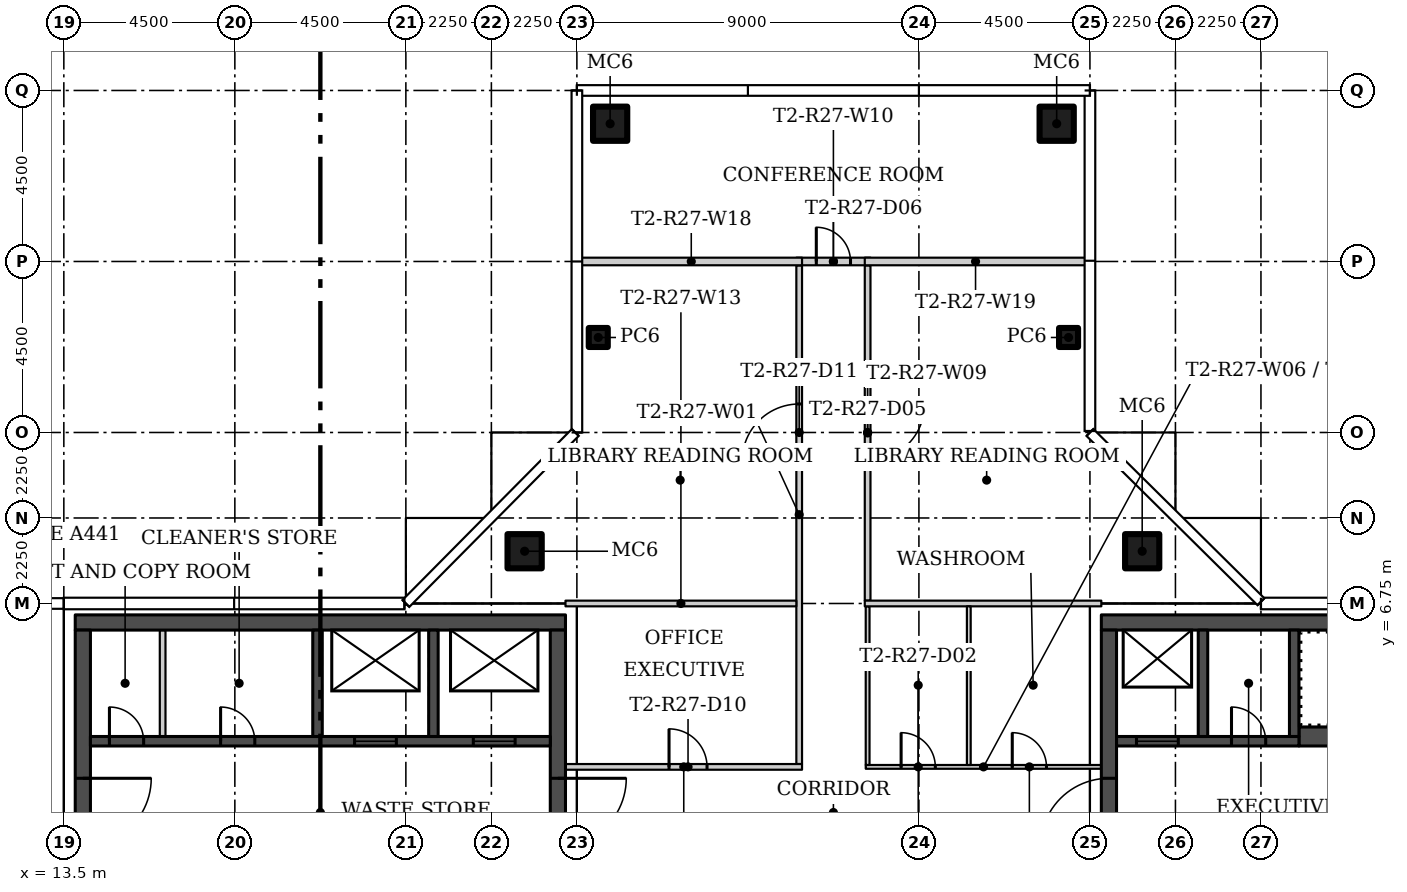
"""IFC4 building model, lengths in metres.
Left out: names, types, materials, properties, quantities, classifications, styles, units other than length and angle.
Written with IfcOpenShell. Run it as: python <this file> out.ifc"""

import sys

from ifc_helpers import new_model, si_unit, direction, frame, frame_2d, origin, origin_2d, place, context, subcontext, project, spatial, rectangle, hollow_rectangle, extrude, element, fill, save


model = new_model("IFC4")
c1 = context("Model", 3, precision=1e-05, world=origin(), true_north=direction((0.0, 1.0)))
c2 = subcontext(c1, "Body", "Model", "MODEL_VIEW")
j1 = project(units=[si_unit("LENGTHUNIT", "METRE"), si_unit("PLANEANGLEUNIT", "RADIAN")], contexts=[c1])
p1 = place(None, origin())
s1 = spatial("IfcSite", under=j1, at=p1, CompositionType="ELEMENT")
p2 = place(p1, origin())
s2 = spatial("IfcBuilding", under=s1, at=p2, CompositionType="ELEMENT")
p3 = place(p2, frame((0.0, 0.0, 249.9)))
s3 = spatial("IfcBuildingStorey", under=s2, at=p3, CompositionType="ELEMENT", Elevation=249.9)
for number, where in (
    (1, (25.625, 8.125, 0.0)),
    (2, (41.875, 8.125, 0.0)),
):
    element("IfcColumn", number, at=place(p3, frame(where)), inside=s3, PredefinedType="COLUMN", context=c2, shape_type="SweptSolid", body=[
        extrude(hollow_rectangle(XDim=0.9, YDim=0.9, WallThickness=0.036, at=origin_2d()), origin(), (0.0, 0.0, 1.0), 3.55),
    ])
p4 = place(p3, frame((39.938, 13.75, 0.0)))
e3 = element("IfcColumn", 3, at=p4, inside=s3, PredefinedType="COLUMN", context=c2, shape_type="SweptSolid", body=[
    extrude(hollow_rectangle(XDim=0.5, YDim=0.5, WallThickness=0.016, at=origin_2d()), origin(), (0.0, 0.0, 1.0), 3.55),
])
p5 = place(p3, frame((39.625, 19.375, 0.0)))
e4 = element("IfcColumn", 4, at=p5, inside=s3, PredefinedType="COLUMN", context=c2, shape_type="SweptSolid", body=[
    extrude(hollow_rectangle(XDim=0.9, YDim=0.9, WallThickness=0.036, at=origin_2d()), origin(), (0.0, 0.0, 1.0), 3.55),
])
p6 = place(p3, frame((27.562, 13.75, 0.0)))
e5 = element("IfcColumn", 5, at=p6, inside=s3, PredefinedType="COLUMN", context=c2, shape_type="SweptSolid", body=[
    extrude(hollow_rectangle(XDim=0.5, YDim=0.5, WallThickness=0.016, at=origin_2d()), origin(), (0.0, 0.0, 1.0), 3.55),
])
p7 = place(p3, frame((27.875, 19.375, 0.0)))
e6 = element("IfcColumn", 6, at=p7, inside=s3, PredefinedType="COLUMN", context=c2, shape_type="SweptSolid", body=[
    extrude(hollow_rectangle(XDim=0.9, YDim=0.9, WallThickness=0.036, at=origin_2d()), origin(), (0.0, 0.0, 1.0), 3.55),
])
p8 = place(p3, frame((32.85, 2.525, 0.0), z_axis=(0.0, 0.0, 1.0), x_axis=(0.0, 1.0, 0.0)))
e7 = element("IfcWall", 7, at=p8, inside=s3, PredefinedType="PARTITIONING", context=c2, shape_type="SweptSolid", body=[
    extrude(rectangle(XDim=13.125, YDim=0.15, at=frame_2d((6.562, 0.0))), origin(), (0.0, 0.0, 1.0), 3.55),
])
p9 = place(p8, frame((7.975, 0.0, 0.0)))
e8 = element("IfcOpeningElement", 8, at=p9, cuts=e7, PredefinedType="OPENING", context=c2, shape_type="SweptSolid", body=[
    extrude(rectangle(XDim=1.5, YDim=2.1, at=frame_2d((0.75, 1.05))), frame((0.0, 0.085, 0.0), z_axis=(0.0, -1.0, 0.0), x_axis=(1.0, 0.0, 0.0)), (0.0, 0.0, 1.0), 0.17),
])
p10 = place(p3, frame((26.7, 2.45, 0.0)))
e9 = element("IfcWall", 9, at=p10, inside=s3, PredefinedType="PARTITIONING", context=c2, shape_type="SweptSolid", body=[
    extrude(rectangle(XDim=6.225, YDim=0.15, at=frame_2d((3.112, 0.0))), origin(), (0.0, 0.0, 1.0), 3.55),
])
p11 = place(p10, frame((2.725, 0.0, 0.0)))
e10 = element("IfcOpeningElement", 10, at=p11, cuts=e9, PredefinedType="OPENING", context=c2, shape_type="SweptSolid", body=[
    extrude(rectangle(XDim=1.0, YDim=2.4, at=frame_2d((0.5, 1.2))), frame((0.0, 0.085, 0.0), z_axis=(0.0, -1.0, 0.0), x_axis=(1.0, 0.0, 0.0)), (0.0, 0.0, 1.0), 0.17),
])
p12 = place(p3, frame((34.6, 2.45, 0.0)))
e11 = element("IfcWall", 11, at=p12, inside=s3, PredefinedType="PARTITIONING", context=c2, shape_type="SweptSolid", body=[
    extrude(rectangle(XDim=6.2, YDim=0.1, at=frame_2d((3.1, 0.0))), origin(), (0.0, 0.0, 1.0), 3.55),
])
p13 = place(p12, frame((3.856, 0.0, 0.0)))
e12 = element("IfcOpeningElement", 12, at=p13, cuts=e11, PredefinedType="OPENING", context=c2, shape_type="SweptSolid", body=[
    extrude(rectangle(XDim=0.9, YDim=2.1, at=frame_2d((0.45, 1.05))), frame((0.0, 0.06, 0.0), z_axis=(0.0, -1.0, 0.0), x_axis=(1.0, 0.0, 0.0)), (0.0, 0.0, 1.0), 0.12),
])
p14 = place(p12, frame((0.931, 0.0, 0.0)))
e13 = element("IfcOpeningElement", 13, at=p14, cuts=e11, PredefinedType="OPENING", context=c2, shape_type="SweptSolid", body=[
    extrude(rectangle(XDim=0.9, YDim=2.1, at=frame_2d((0.45, 1.05))), frame((0.0, 0.06, 0.0), z_axis=(0.0, -1.0, 0.0), x_axis=(1.0, 0.0, 0.0)), (0.0, 0.0, 1.0), 0.12),
])
p15 = place(p3, frame((34.65, 6.675, 0.0), z_axis=(0.0, 0.0, 1.0), x_axis=(0.0, -1.0, 0.0)))
e14 = element("IfcWall", 14, at=p15, inside=s3, PredefinedType="PARTITIONING", context=c2, shape_type="SweptSolid", body=[
    extrude(rectangle(XDim=4.175, YDim=0.1, at=frame_2d((2.087, 0.0))), origin(), (0.0, 0.0, 1.0), 3.55),
])
p16 = place(p3, frame((34.65, 15.65, 0.0), z_axis=(0.0, 0.0, 1.0), x_axis=(0.0, -1.0, 0.0)))
e15 = element("IfcWall", 15, at=p16, inside=s3, PredefinedType="PARTITIONING", context=c2, shape_type="SweptSolid", body=[
    extrude(rectangle(XDim=8.825, YDim=0.15, at=frame_2d((4.413, 0.0))), origin(), (0.0, 0.0, 1.0), 3.55),
])
p17 = place(p16, frame((3.65, 0.0, 0.0)))
e16 = element("IfcOpeningElement", 16, at=p17, cuts=e15, PredefinedType="OPENING", context=c2, shape_type="SweptSolid", body=[
    extrude(rectangle(XDim=1.5, YDim=2.1, at=frame_2d((0.75, 1.05))), frame((0.0, 0.085, 0.0), z_axis=(0.0, -1.0, 0.0), x_axis=(1.0, 0.0, 0.0)), (0.0, 0.0, 1.0), 0.17),
])
p18 = place(p3, frame((32.775, 15.75, 0.0)))
e17 = element("IfcWall", 17, at=p18, inside=s3, PredefinedType="PARTITIONING", context=c2, shape_type="SweptSolid", body=[
    extrude(rectangle(XDim=1.951, YDim=0.2, at=frame_2d((0.975, 0.0))), origin(), (0.0, 0.0, 1.0), 3.55),
])
p19 = place(p18, frame((0.525, 0.0, 0.0)))
e18 = element("IfcOpeningElement", 18, at=p19, cuts=e17, PredefinedType="OPENING", context=c2, shape_type="SweptSolid", body=[
    extrude(rectangle(XDim=0.9, YDim=2.4, at=frame_2d((0.45, 1.2))), frame((0.0, 0.11, 0.0), z_axis=(0.0, -1.0, 0.0), x_axis=(1.0, 0.0, 0.0)), (0.0, 0.0, 1.0), 0.22),
])
p20 = place(p3, frame((32.775, 6.75, 0.0), z_axis=(0.0, 0.0, 1.0), x_axis=(-1.0, 0.0, 0.0)))
e19 = element("IfcWall", 19, at=p20, inside=s3, PredefinedType="PARTITIONING", context=c2, shape_type="SweptSolid", body=[
    extrude(rectangle(XDim=6.075, YDim=0.15, at=frame_2d((3.037, 0.0))), origin(), (0.0, 0.0, 1.0), 3.55),
])
p21 = place(p3, frame((40.8, 6.75, 0.0), z_axis=(0.0, 0.0, 1.0), x_axis=(-1.0, 0.0, 0.0)))
e20 = element("IfcWall", 20, at=p21, inside=s3, PredefinedType="PARTITIONING", context=c2, shape_type="SweptSolid", body=[
    extrude(rectangle(XDim=6.225, YDim=0.15, at=frame_2d((3.112, 0.0))), origin(), (0.0, 0.0, 1.0), 3.55),
])
p22 = place(p3, frame((37.312, 6.675, 0.0), z_axis=(0.0, 0.0, 1.0), x_axis=(0.0, -1.0, 0.0)))
e21 = element("IfcWall", 21, at=p22, inside=s3, PredefinedType="PARTITIONING", context=c2, shape_type="SweptSolid", body=[
    extrude(rectangle(XDim=4.175, YDim=0.1, at=frame_2d((2.087, 0.0))), origin(), (0.0, 0.0, 1.0), 3.55),
])
for number, where, z_axis, x_axis in (
    (22, (32.925, 15.75, 0.0), (0.0, 0.0, 1.0), (-1.0, 0.0, 0.0)),
    (23, (40.405, 15.75, 0.0), (0.0, 0.0, 1.0), (-1.0, 0.0, 0.0)),
):
    element("IfcWall", number, at=place(p3, frame(where, z_axis=z_axis, x_axis=x_axis)), inside=s3, PredefinedType="PARTITIONING", context=c2, shape_type="SweptSolid", body=[
        extrude(rectangle(XDim=5.83, YDim=0.2, at=frame_2d((2.915, 0.0))), origin(), (0.0, 0.0, 1.0), 3.55),
    ])
p23 = place(p3, frame((13.8, 6.25, 0.0)))
e24 = element("IfcWall", 24, at=p23, inside=s3, PredefinedType="SHEAR", context=c2, shape_type="SweptSolid", body=[
    extrude(rectangle(XDim=12.9, YDim=0.4, at=frame_2d((6.45, 0.0))), origin(), (0.0, 0.0, 1.0), 3.55),
])
p24 = place(p3, frame((14.0, 6.05, 0.0), z_axis=(0.0, 0.0, 1.0), x_axis=(0.0, -1.0, 0.0)))
e25 = element("IfcWall", 25, at=p24, inside=s3, PredefinedType="SHEAR", context=c2, shape_type="SweptSolid", body=[
    extrude(rectangle(XDim=12.1, YDim=0.4, at=frame_2d((6.05, 0.0))), origin(), (0.0, 0.0, 1.0), 3.55),
])
p25 = place(p24, frame((3.9, 0.0, 0.0)))
e26 = element("IfcOpeningElement", 26, at=p25, cuts=e25, PredefinedType="OPENING", context=c2, shape_type="SweptSolid", body=[
    extrude(rectangle(XDim=1.8, YDim=2.4, at=frame_2d((0.9, 1.2))), frame((0.0, 0.21, 0.0), z_axis=(0.0, -1.0, 0.0), x_axis=(1.0, 0.0, 0.0)), (0.0, 0.0, 1.0), 0.42),
])
p26 = place(p3, frame((26.5, 6.05, 0.0), z_axis=(0.0, 0.0, 1.0), x_axis=(0.0, -1.0, 0.0)))
e27 = element("IfcWall", 27, at=p26, inside=s3, PredefinedType="SHEAR", context=c2, shape_type="SweptSolid", body=[
    extrude(rectangle(XDim=12.1, YDim=0.4, at=frame_2d((6.05, 0.0))), origin(), (0.0, 0.0, 1.0), 3.55),
])
p27 = place(p26, frame((10.1, 0.0, 0.0)))
e28 = element("IfcOpeningElement", 28, at=p27, cuts=e27, PredefinedType="OPENING", context=c2, shape_type="SweptSolid", body=[
    extrude(rectangle(XDim=1.2, YDim=2.1, at=frame_2d((0.6, 1.05))), frame((0.0, 0.21, 0.0), z_axis=(0.0, -1.0, 0.0), x_axis=(1.0, 0.0, 0.0)), (0.0, 0.0, 1.0), 0.42),
])
p28 = place(p26, frame((3.9, 0.0, 0.0)))
e29 = element("IfcOpeningElement", 29, at=p28, cuts=e27, PredefinedType="OPENING", context=c2, shape_type="SweptSolid", body=[
    extrude(rectangle(XDim=1.8, YDim=2.4, at=frame_2d((0.9, 1.2))), frame((0.0, 0.21, 0.0), z_axis=(0.0, -1.0, 0.0), x_axis=(1.0, 0.0, 0.0)), (0.0, 0.0, 1.0), 0.42),
])
p29 = place(p3, frame((14.2, 3.125, 0.0)))
e30 = element("IfcWall", 30, at=p29, inside=s3, PredefinedType="SHEAR", context=c2, shape_type="SweptSolid", body=[
    extrude(rectangle(XDim=12.1, YDim=0.25, at=frame_2d((6.05, 0.0))), origin(), (0.0, 0.0, 1.0), 3.55),
])
p30 = place(p29, frame((6.95, 0.0, 0.0)))
e31 = element("IfcOpeningElement", 31, at=p30, cuts=e30, PredefinedType="OPENING", context=c2, shape_type="SweptSolid", body=[
    extrude(rectangle(XDim=1.1, YDim=2.1, at=frame_2d((0.55, 1.05))), frame((0.0, 0.135, 0.0), z_axis=(0.0, -1.0, 0.0), x_axis=(1.0, 0.0, 0.0)), (0.0, 0.0, 1.0), 0.27),
])
p31 = place(p29, frame((10.075, 0.0, 0.0)))
e32 = element("IfcOpeningElement", 32, at=p31, cuts=e30, PredefinedType="OPENING", context=c2, shape_type="SweptSolid", body=[
    extrude(rectangle(XDim=1.1, YDim=2.1, at=frame_2d((0.55, 1.05))), frame((0.0, 0.135, 0.0), z_axis=(0.0, -1.0, 0.0), x_axis=(1.0, 0.0, 0.0)), (0.0, 0.0, 1.0), 0.27),
])
p32 = place(p29, frame((0.5, 0.0, 0.0)))
e33 = element("IfcOpeningElement", 33, at=p32, cuts=e30, PredefinedType="OPENING", context=c2, shape_type="SweptSolid", body=[
    extrude(rectangle(XDim=0.9, YDim=2.1, at=frame_2d((0.45, 1.05))), frame((0.0, 0.135, 0.0), z_axis=(0.0, -1.0, 0.0), x_axis=(1.0, 0.0, 0.0)), (0.0, 0.0, 1.0), 0.27),
])
p33 = place(p29, frame((3.425, 0.0, 0.0)))
e34 = element("IfcOpeningElement", 34, at=p33, cuts=e30, PredefinedType="OPENING", context=c2, shape_type="SweptSolid", body=[
    extrude(rectangle(XDim=0.9, YDim=2.1, at=frame_2d((0.45, 1.05))), frame((0.0, 0.135, 0.0), z_axis=(0.0, -1.0, 0.0), x_axis=(1.0, 0.0, 0.0)), (0.0, 0.0, 1.0), 0.27),
])
for number, where, z_axis, x_axis in (
    (35, (20.175, 3.25, 0.0), (0.0, 0.0, 1.0), (0.0, 1.0, 0.0)),
    (36, (23.225, 3.25, 0.0), (0.0, 0.0, 1.0), (0.0, 1.0, 0.0)),
):
    element("IfcWall", number, at=place(p3, frame(where, z_axis=z_axis, x_axis=x_axis)), inside=s3, PredefinedType="SHEAR", context=c2, shape_type="SweptSolid", body=[
        extrude(rectangle(XDim=2.8, YDim=0.25, at=frame_2d((1.4, 0.0))), origin(), (0.0, 0.0, 1.0), 3.55),
    ])
p34 = place(p3, frame((16.1, 3.25, 0.0), z_axis=(0.0, 0.0, 1.0), x_axis=(0.0, 1.0, 0.0)))
e37 = element("IfcWall", 37, at=p34, inside=s3, PredefinedType="PARTITIONING", context=c2, shape_type="SweptSolid", body=[
    extrude(rectangle(XDim=2.8, YDim=0.15, at=frame_2d((1.4, 0.0))), origin(), (0.0, 0.0, 1.0), 3.55),
])
p35 = place(p3, frame((53.7, 6.25, 0.0), z_axis=(0.0, 0.0, 1.0), x_axis=(-1.0, 0.0, 0.0)))
e38 = element("IfcWall", 38, at=p35, inside=s3, PredefinedType="SHEAR", context=c2, shape_type="SweptSolid", body=[
    extrude(rectangle(XDim=12.9, YDim=0.4, at=frame_2d((6.45, 0.0))), origin(), (0.0, 0.0, 1.0), 3.55),
])
p36 = place(p3, frame((41.0, -6.05, 0.0), z_axis=(0.0, 0.0, 1.0), x_axis=(0.0, 1.0, 0.0)))
e39 = element("IfcWall", 39, at=p36, inside=s3, PredefinedType="SHEAR", context=c2, shape_type="SweptSolid", body=[
    extrude(rectangle(XDim=12.1, YDim=0.4, at=frame_2d((6.05, 0.0))), origin(), (0.0, 0.0, 1.0), 3.55),
])
p37 = place(p36, frame((0.8, 0.0, 0.0)))
e40 = element("IfcOpeningElement", 40, at=p37, cuts=e39, PredefinedType="OPENING", context=c2, shape_type="SweptSolid", body=[
    extrude(rectangle(XDim=1.2, YDim=2.1, at=frame_2d((0.6, 1.05))), frame((0.0, 0.21, 0.0), z_axis=(0.0, -1.0, 0.0), x_axis=(1.0, 0.0, 0.0)), (0.0, 0.0, 1.0), 0.42),
])
p38 = place(p36, frame((6.4, 0.0, 0.0)))
e41 = element("IfcOpeningElement", 41, at=p38, cuts=e39, PredefinedType="OPENING", context=c2, shape_type="SweptSolid", body=[
    extrude(rectangle(XDim=1.8, YDim=2.4, at=frame_2d((0.9, 1.2))), frame((0.0, 0.21, 0.0), z_axis=(0.0, -1.0, 0.0), x_axis=(1.0, 0.0, 0.0)), (0.0, 0.0, 1.0), 0.42),
])
p39 = place(p3, frame((46.0, 3.25, 0.0)))
e42 = element("IfcWall", 42, at=p39, inside=s3, PredefinedType="SHEAR", context=c2, shape_type="SweptSolid", body=[
    extrude(rectangle(XDim=7.3, YDim=0.5, at=frame_2d((3.65, 0.0))), origin(), (0.0, 0.0, 1.0), 3.55),
])
p40 = place(p39, frame((6.15, 0.0, 0.0)))
e43 = element("IfcOpeningElement", 43, at=p40, cuts=e42, PredefinedType="OPENING", context=c2, shape_type="SweptSolid", body=[
    extrude(rectangle(XDim=1.1, YDim=2.1, at=frame_2d((0.55, 1.05))), frame((0.0, 0.26, 0.0), z_axis=(0.0, -1.0, 0.0), x_axis=(1.0, 0.0, 0.0)), (0.0, 0.0, 1.0), 0.52),
])
p41 = place(p3, frame((41.2, 3.125, 0.0)))
e44 = element("IfcWall", 44, at=p41, inside=s3, PredefinedType="SHEAR", context=c2, shape_type="SweptSolid", body=[
    extrude(rectangle(XDim=4.8, YDim=0.25, at=frame_2d((2.4, 0.0))), origin(), (0.0, 0.0, 1.0), 3.55),
])
p42 = place(p41, frame((0.525, 0.0, 0.0)))
e45 = element("IfcOpeningElement", 45, at=p42, cuts=e44, PredefinedType="OPENING", context=c2, shape_type="SweptSolid", body=[
    extrude(rectangle(XDim=1.1, YDim=2.1, at=frame_2d((0.55, 1.05))), frame((0.0, 0.135, 0.0), z_axis=(0.0, -1.0, 0.0), x_axis=(1.0, 0.0, 0.0)), (0.0, 0.0, 1.0), 0.27),
])
p43 = place(p41, frame((3.025, 0.0, 0.0)))
e46 = element("IfcOpeningElement", 46, at=p43, cuts=e44, PredefinedType="OPENING", context=c2, shape_type="SweptSolid", body=[
    extrude(rectangle(XDim=0.9, YDim=2.1, at=frame_2d((0.45, 1.05))), frame((0.0, 0.135, 0.0), z_axis=(0.0, -1.0, 0.0), x_axis=(1.0, 0.0, 0.0)), (0.0, 0.0, 1.0), 0.27),
])
for number, where, z_axis, x_axis in (
    (47, (45.875, 3.25, 0.0), (0.0, 0.0, 1.0), (0.0, 1.0, 0.0)),
    (48, (43.475, 3.25, 0.0), (0.0, 0.0, 1.0), (0.0, 1.0, 0.0)),
):
    element("IfcWall", number, at=place(p3, frame(where, z_axis=z_axis, x_axis=x_axis)), inside=s3, PredefinedType="SHEAR", context=c2, shape_type="SweptSolid", body=[
        extrude(rectangle(XDim=2.8, YDim=0.25, at=frame_2d((1.4, 0.0))), origin(), (0.0, 0.0, 1.0), 3.55),
    ])
p44 = place(p13, origin())
e49 = element("IfcDoor", 49, at=p44, inside=s3, OperationType="SINGLE_SWING_RIGHT", PredefinedType="DOOR", context=c2, shape_type="SweptSolid", body=[
    extrude(rectangle(XDim=0.9, YDim=2.1, at=frame_2d((0.45, 1.05))), frame((0.0, 0.025, 0.0), z_axis=(0.0, -1.0, 0.0), x_axis=(1.0, 0.0, 0.0)), (0.0, 0.0, 1.0), 0.05),
])
fill(e12, e49)
p45 = place(p14, origin())
e50 = element("IfcDoor", 50, at=p45, inside=s3, OperationType="SINGLE_SWING_RIGHT", PredefinedType="DOOR", context=c2, shape_type="SweptSolid", body=[
    extrude(rectangle(XDim=0.9, YDim=2.1, at=frame_2d((0.45, 1.05))), frame((0.0, 0.025, 0.0), z_axis=(0.0, -1.0, 0.0), x_axis=(1.0, 0.0, 0.0)), (0.0, 0.0, 1.0), 0.05),
])
fill(e13, e50)
p46 = place(p17, origin())
e51 = element("IfcDoor", 51, at=p46, inside=s3, OperationType="DOUBLE_DOOR_SINGLE_SWING", PredefinedType="DOOR", context=c2, shape_type="SweptSolid", body=[
    extrude(rectangle(XDim=1.5, YDim=2.1, at=frame_2d((0.75, 1.05))), frame((0.0, 0.025, 0.0), z_axis=(0.0, -1.0, 0.0), x_axis=(1.0, 0.0, 0.0)), (0.0, 0.0, 1.0), 0.05),
])
fill(e16, e51)
p47 = place(p19, origin())
e52 = element("IfcDoor", 52, at=p47, inside=s3, OperationType="SINGLE_SWING_RIGHT", PredefinedType="DOOR", context=c2, shape_type="SweptSolid", body=[
    extrude(rectangle(XDim=0.9, YDim=2.4, at=frame_2d((0.45, 1.2))), frame((0.0, 0.025, 0.0), z_axis=(0.0, -1.0, 0.0), x_axis=(1.0, 0.0, 0.0)), (0.0, 0.0, 1.0), 0.05),
])
fill(e18, e52)
p48 = place(p11, origin())
e53 = element("IfcDoor", 53, at=p48, inside=s3, OperationType="SINGLE_SWING_LEFT", PredefinedType="DOOR", context=c2, shape_type="SweptSolid", body=[
    extrude(rectangle(XDim=1.0, YDim=2.4, at=frame_2d((0.5, 1.2))), frame((0.0, 0.025, 0.0), z_axis=(0.0, -1.0, 0.0), x_axis=(1.0, 0.0, 0.0)), (0.0, 0.0, 1.0), 0.05),
])
fill(e10, e53)
p49 = place(p9, origin())
e54 = element("IfcDoor", 54, at=p49, inside=s3, OperationType="DOUBLE_DOOR_SINGLE_SWING", PredefinedType="DOOR", context=c2, shape_type="SweptSolid", body=[
    extrude(rectangle(XDim=1.5, YDim=2.1, at=frame_2d((0.75, 1.05))), frame((0.0, 0.025, 0.0), z_axis=(0.0, -1.0, 0.0), x_axis=(1.0, 0.0, 0.0)), (0.0, 0.0, 1.0), 0.05),
])
fill(e8, e54)
p50 = place(p25, origin())
e55 = element("IfcDoor", 55, at=p50, inside=s3, OperationType="DOUBLE_DOOR_SINGLE_SWING", PredefinedType="DOOR", context=c2, shape_type="SweptSolid", body=[
    extrude(rectangle(XDim=1.8, YDim=2.4, at=frame_2d((0.9, 1.2))), frame((0.0, 0.025, 0.0), z_axis=(0.0, -1.0, 0.0), x_axis=(1.0, 0.0, 0.0)), (0.0, 0.0, 1.0), 0.05),
])
fill(e26, e55)
p51 = place(p28, origin())
e56 = element("IfcDoor", 56, at=p51, inside=s3, OperationType="DOUBLE_DOOR_SINGLE_SWING", PredefinedType="DOOR", context=c2, shape_type="SweptSolid", body=[
    extrude(rectangle(XDim=1.8, YDim=2.4, at=frame_2d((0.9, 1.2))), frame((0.0, 0.025, 0.0), z_axis=(0.0, -1.0, 0.0), x_axis=(1.0, 0.0, 0.0)), (0.0, 0.0, 1.0), 0.05),
])
fill(e29, e56)
p52 = place(p30, origin())
e57 = element("IfcDoor", 57, at=p52, inside=s3, OperationType="SLIDING_TO_LEFT", PredefinedType="DOOR", context=c2, shape_type="SweptSolid", body=[
    extrude(rectangle(XDim=1.1, YDim=2.1, at=frame_2d((0.55, 1.05))), frame((0.0, 0.025, 0.0), z_axis=(0.0, -1.0, 0.0), x_axis=(1.0, 0.0, 0.0)), (0.0, 0.0, 1.0), 0.05),
])
fill(e31, e57)
p53 = place(p31, origin())
e58 = element("IfcDoor", 58, at=p53, inside=s3, OperationType="SLIDING_TO_LEFT", PredefinedType="DOOR", context=c2, shape_type="SweptSolid", body=[
    extrude(rectangle(XDim=1.1, YDim=2.1, at=frame_2d((0.55, 1.05))), frame((0.0, 0.025, 0.0), z_axis=(0.0, -1.0, 0.0), x_axis=(1.0, 0.0, 0.0)), (0.0, 0.0, 1.0), 0.05),
])
fill(e32, e58)
p54 = place(p32, origin())
e59 = element("IfcDoor", 59, at=p54, inside=s3, OperationType="SINGLE_SWING_LEFT", PredefinedType="DOOR", context=c2, shape_type="SweptSolid", body=[
    extrude(rectangle(XDim=0.9, YDim=2.1, at=frame_2d((0.45, 1.05))), frame((0.0, 0.025, 0.0), z_axis=(0.0, -1.0, 0.0), x_axis=(1.0, 0.0, 0.0)), (0.0, 0.0, 1.0), 0.05),
])
fill(e33, e59)
p55 = place(p33, origin())
e60 = element("IfcDoor", 60, at=p55, inside=s3, OperationType="SINGLE_SWING_LEFT", PredefinedType="DOOR", context=c2, shape_type="SweptSolid", body=[
    extrude(rectangle(XDim=0.9, YDim=2.1, at=frame_2d((0.45, 1.05))), frame((0.0, 0.025, 0.0), z_axis=(0.0, -1.0, 0.0), x_axis=(1.0, 0.0, 0.0)), (0.0, 0.0, 1.0), 0.05),
])
fill(e34, e60)
p56 = place(p38, origin())
e61 = element("IfcDoor", 61, at=p56, inside=s3, OperationType="DOUBLE_DOOR_SINGLE_SWING", PredefinedType="DOOR", context=c2, shape_type="SweptSolid", body=[
    extrude(rectangle(XDim=1.8, YDim=2.4, at=frame_2d((0.9, 1.2))), frame((0.0, 0.025, 0.0), z_axis=(0.0, -1.0, 0.0), x_axis=(1.0, 0.0, 0.0)), (0.0, 0.0, 1.0), 0.05),
])
fill(e41, e61)
p57 = place(p42, origin())
e62 = element("IfcDoor", 62, at=p57, inside=s3, OperationType="SLIDING_TO_LEFT", PredefinedType="DOOR", context=c2, shape_type="SweptSolid", body=[
    extrude(rectangle(XDim=1.1, YDim=2.1, at=frame_2d((0.55, 1.05))), frame((0.0, 0.025, 0.0), z_axis=(0.0, -1.0, 0.0), x_axis=(1.0, 0.0, 0.0)), (0.0, 0.0, 1.0), 0.05),
])
fill(e45, e62)
p58 = place(p43, origin())
e63 = element("IfcDoor", 63, at=p58, inside=s3, OperationType="SINGLE_SWING_RIGHT", PredefinedType="DOOR", context=c2, shape_type="SweptSolid", body=[
    extrude(rectangle(XDim=0.9, YDim=2.1, at=frame_2d((0.45, 1.05))), frame((0.0, 0.025, 0.0), z_axis=(0.0, -1.0, 0.0), x_axis=(1.0, 0.0, 0.0)), (0.0, 0.0, 1.0), 0.05),
])
fill(e46, e63)
save(model, sys.argv[1])
